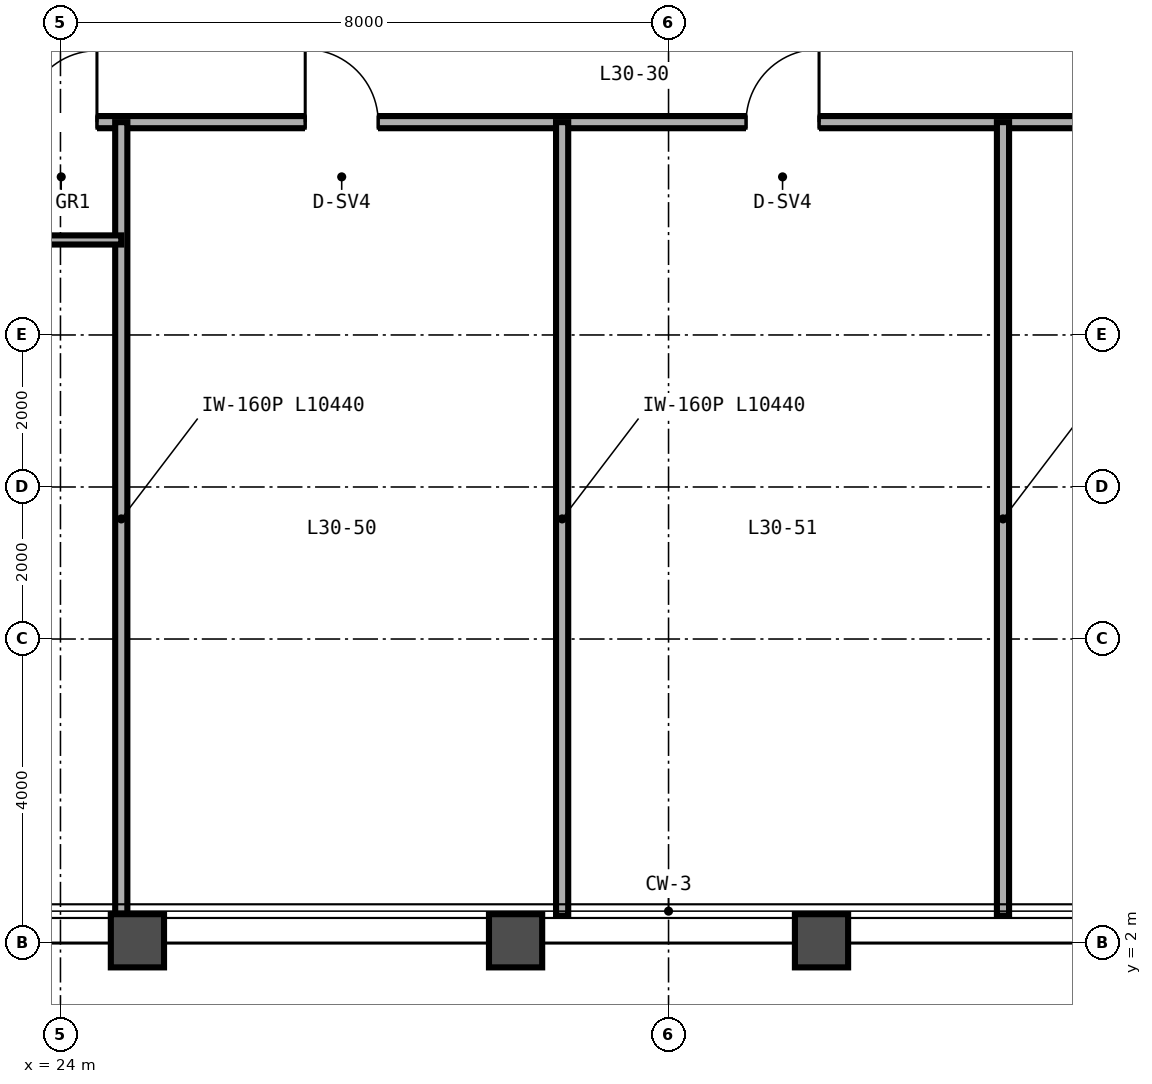
"""IFC4 building model, lengths in metres.
Left out: names, types, materials, properties, quantities, classifications, styles, units other than length and angle.
Written with IfcOpenShell. Run it as: python <this file> out.ifc"""

import sys

from ifc_helpers import new_model, si_unit, direction, frame, frame_2d, origin, place, context, subcontext, project, spatial, rectangle, extrude, source, transform, mapped, element, fill, save


model = new_model("IFC4")
c1 = context("Model", 3, precision=1e-05, world=origin(), true_north=direction((0.0, 1.0)))
c2 = subcontext(c1, "Body", "Model", "MODEL_VIEW")
j1 = project(units=[si_unit("LENGTHUNIT", "METRE"), si_unit("PLANEANGLEUNIT", "RADIAN")], contexts=[c1])
p1 = place(None, origin())
s1 = spatial("IfcSite", under=j1, at=p1, CompositionType="ELEMENT")
p2 = place(p1, origin())
s2 = spatial("IfcBuilding", under=s1, at=p2, CompositionType="ELEMENT")
p3 = place(p2, frame((0.0, 0.0, 122.4)))
s3 = spatial("IfcBuildingStorey", under=s2, at=p3, CompositionType="ELEMENT", Elevation=122.4)
p4 = place(p3, frame((14.0, 12.8, 0.0), z_axis=(0.0, 0.0, 1.0), x_axis=(1.0, 0.0, 0.0)))
e1 = element("IfcWall", 1, at=p4, inside=s3, PredefinedType="PARTITIONING", context=c2, shape_type="SweptSolid", body=[
    extrude(rectangle(XDim=36.0, YDim=0.16, at=frame_2d((18.0, 0.0))), origin(), (0.0, 0.0, 1.0), 2.581),
])
p5 = place(p4, frame((4.14, 0.0, 0.0)))
e2 = element("IfcOpeningElement", 2, at=p5, cuts=e1, PredefinedType="OPENING", context=c2, shape_type="SweptSolid", body=[
    extrude(rectangle(XDim=0.94, YDim=2.15, at=frame_2d((0.47, 1.075))), frame((0.0, 0.09, 0.0), z_axis=(0.0, -1.0, 0.0), x_axis=(1.0, 0.0, 0.0)), (0.0, 0.0, 1.0), 0.18),
])
p6 = place(p4, frame((9.54, 0.0, 0.0)))
e3 = element("IfcOpeningElement", 3, at=p6, cuts=e1, PredefinedType="OPENING", context=c2, shape_type="SweptSolid", body=[
    extrude(rectangle(XDim=0.94, YDim=2.15, at=frame_2d((0.47, 1.075))), frame((0.0, 0.09, 0.0), z_axis=(0.0, -1.0, 0.0), x_axis=(1.0, 0.0, 0.0)), (0.0, 0.0, 1.0), 0.18),
])
p7 = place(p4, frame((13.22, 0.0, 0.0)))
e4 = element("IfcOpeningElement", 4, at=p7, cuts=e1, PredefinedType="OPENING", context=c2, shape_type="SweptSolid", body=[
    extrude(rectangle(XDim=0.96, YDim=2.15, at=frame_2d((0.48, 1.075))), frame((0.0, 0.09, 0.0), z_axis=(0.0, -1.0, 0.0), x_axis=(1.0, 0.0, 0.0)), (0.0, 0.0, 1.0), 0.18),
])
p8 = place(p4, frame((19.02, 0.0, 0.0)))
e5 = element("IfcOpeningElement", 5, at=p8, cuts=e1, PredefinedType="OPENING", context=c2, shape_type="SweptSolid", body=[
    extrude(rectangle(XDim=0.96, YDim=2.15, at=frame_2d((0.48, 1.075))), frame((0.0, 0.09, 0.0), z_axis=(0.0, -1.0, 0.0), x_axis=(1.0, 0.0, 0.0)), (0.0, 0.0, 1.0), 0.18),
])
p9 = place(p4, frame((24.62, 0.0, 0.0)))
e6 = element("IfcOpeningElement", 6, at=p9, cuts=e1, PredefinedType="OPENING", context=c2, shape_type="SweptSolid", body=[
    extrude(rectangle(XDim=0.96, YDim=2.15, at=frame_2d((0.48, 1.075))), frame((0.0, 0.09, 0.0), z_axis=(0.0, -1.0, 0.0), x_axis=(1.0, 0.0, 0.0)), (0.0, 0.0, 1.0), 0.18),
])
p10 = place(p4, frame((30.74, 0.0, 0.0)))
e7 = element("IfcOpeningElement", 7, at=p10, cuts=e1, PredefinedType="OPENING", context=c2, shape_type="SweptSolid", body=[
    extrude(rectangle(XDim=0.94, YDim=2.15, at=frame_2d((0.47, 1.075))), frame((0.0, 0.09, 0.0), z_axis=(0.0, -1.0, 0.0), x_axis=(1.0, 0.0, 0.0)), (0.0, 0.0, 1.0), 0.18),
])
p11 = place(p4, frame((33.52, 0.0, 0.0)))
e8 = element("IfcOpeningElement", 8, at=p11, cuts=e1, PredefinedType="OPENING", context=c2, shape_type="SweptSolid", body=[
    extrude(rectangle(XDim=0.96, YDim=2.15, at=frame_2d((0.48, 1.075))), frame((0.0, 0.09, 0.0), z_axis=(0.0, -1.0, 0.0), x_axis=(1.0, 0.0, 0.0)), (0.0, 0.0, 1.0), 0.18),
])
p12 = place(p3, frame((24.8, 2.36, 0.0), z_axis=(0.0, 0.0, 1.0), x_axis=(0.0, 1.0, 0.0)))
e9 = element("IfcWall", 9, at=p12, inside=s3, PredefinedType="PARTITIONING", context=c2, shape_type="SweptSolid", body=[
    extrude(rectangle(XDim=10.44, YDim=0.16, at=frame_2d((5.22, 0.0))), origin(), (0.0, 0.0, 1.0), 2.433),
])
p13 = place(p3, frame((23.7, 11.25, 0.0), z_axis=(0.0, 0.0, 1.0), x_axis=(1.0, 0.0, 0.0)))
e10 = element("IfcWall", 10, at=p13, inside=s3, PredefinedType="PARTITIONING", context=c2, shape_type="SweptSolid", body=[
    extrude(rectangle(XDim=1.1, YDim=0.12, at=frame_2d((0.55, 0.0))), origin(), (0.0, 0.0, 1.0), 2.581),
])
for number, where, z_axis, x_axis in (
    (11, (30.6, 2.36, 0.0), (0.0, 0.0, 1.0), (0.0, 1.0, 0.0)),
    (12, (36.4, 2.36, 0.0), (0.0, 0.0, 1.0), (0.0, 1.0, 0.0)),
):
    element("IfcWall", number, at=place(p3, frame(where, z_axis=z_axis, x_axis=x_axis)), inside=s3, PredefinedType="PARTITIONING", context=c2, shape_type="SweptSolid", body=[
        extrude(rectangle(XDim=10.44, YDim=0.16, at=frame_2d((5.22, 0.0))), origin(), (0.0, 0.0, 1.0), 2.433),
    ])
m1 = source(origin(), c2, "Body", "SweptSolid", [
    extrude(rectangle(XDim=0.94, YDim=2.15, at=frame_2d((0.47, 1.075))), frame((0.0, 0.025, 0.0), z_axis=(0.0, -1.0, 0.0), x_axis=(1.0, 0.0, 0.0)), (0.0, 0.0, 1.0), 0.05),
])
p14 = place(p6, origin())
e13 = element("IfcDoor", 13, at=p14, inside=s3, OperationType="SINGLE_SWING_RIGHT", PredefinedType="DOOR", context=c2, shape_type="MappedRepresentation", body=[
    mapped(m1, transform((0.0, 0.0, 0.0), scale=1.0)),
])
fill(e3, e13)
m2 = source(origin(), c2, "Body", "SweptSolid", [
    extrude(rectangle(XDim=0.96, YDim=2.15, at=frame_2d((0.48, 1.075))), frame((0.0, 0.025, 0.0), z_axis=(0.0, -1.0, 0.0), x_axis=(1.0, 0.0, 0.0)), (0.0, 0.0, 1.0), 0.05),
])
p15 = place(p7, origin())
e14 = element("IfcDoor", 14, at=p15, inside=s3, OperationType="SINGLE_SWING_LEFT", PredefinedType="DOOR", context=c2, shape_type="MappedRepresentation", body=[
    mapped(m2, transform((0.0, 0.0, 0.0), scale=1.0)),
])
fill(e4, e14)
p16 = place(p8, origin())
e15 = element("IfcDoor", 15, at=p16, inside=s3, OperationType="SINGLE_SWING_RIGHT", PredefinedType="DOOR", context=c2, shape_type="MappedRepresentation", body=[
    mapped(m2, transform((0.0, 0.0, 0.0), scale=1.0)),
])
fill(e5, e15)
save(model, sys.argv[1])
